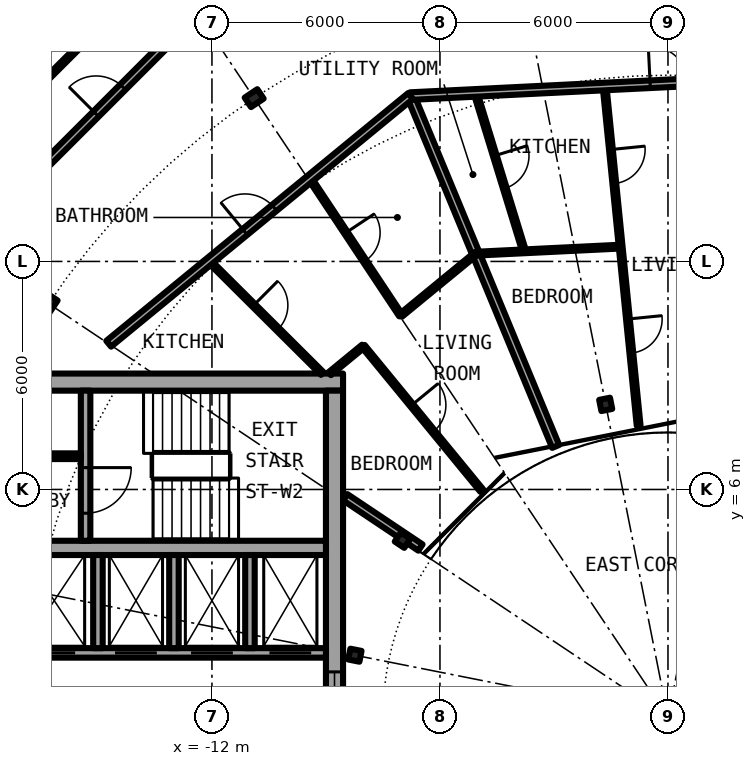
"""IFC4 building model, lengths in metres.
Left out: names, types, materials, properties, quantities, classifications, styles, units other than length and angle.
Written with IfcOpenShell. Run it as: python <this file> out.ifc"""

import sys

from ifc_helpers import new_model, si_unit, direction, frame, frame_2d, origin, origin_2d, place, context, subcontext, project, spatial, rectangle, i_section, extrude, element, fill, save


model = new_model("IFC4")
c1 = context("Model", 3, precision=1e-05, world=origin(), true_north=direction((0.0, 1.0)))
c2 = subcontext(c1, "Body", "Model", "MODEL_VIEW")
j1 = project(units=[si_unit("LENGTHUNIT", "METRE"), si_unit("PLANEANGLEUNIT", "RADIAN")], contexts=[c1])
p1 = place(None, origin())
s1 = spatial("IfcSite", under=j1, at=p1, CompositionType="ELEMENT")
p2 = place(p1, origin())
s2 = spatial("IfcBuilding", under=s1, at=p2, CompositionType="ELEMENT")
p3 = place(p2, frame((0.0, 0.0, 202.4)))
s3 = spatial("IfcBuildingStorey", under=s2, at=p3, CompositionType="ELEMENT", Elevation=202.4)
for number, where, z_axis, x_axis in (
    (1, (-10.889, 16.297, 0.0), (0.0, 0.0, 1.0), (-0.556, 0.831, 0.0)),
    (2, (-16.297, 10.889, 0.0), (0.0, 0.0, 1.0), (-0.831, 0.556, 0.0)),
):
    element("IfcColumn", number, at=place(p3, frame(where, z_axis=z_axis, x_axis=x_axis)), inside=s3, PredefinedType="COLUMN", context=c2, shape_type="SweptSolid", body=[
        extrude(i_section(OverallWidth=0.3, OverallDepth=0.4, WebThickness=0.013, FlangeThickness=0.024, FilletRadius=0.027, at=origin_2d()), origin(), (0.0, 0.0, 1.0), 3.05),
    ])
for number, where, z_axis, x_axis in (
    (3, (-1.639, 8.239, 0.0), (0.0, 0.0, 1.0), (-0.195, 0.981, 0.0)),
    (4, (-6.984, 4.667, 0.0), (0.0, 0.0, 1.0), (-0.831, 0.556, 0.0)),
    (5, (-8.239, 1.639, 0.0), (0.0, 0.0, 1.0), (-0.981, 0.195, 0.0)),
):
    element("IfcColumn", number, at=place(p3, frame(where, z_axis=z_axis, x_axis=x_axis)), inside=s3, PredefinedType="COLUMN", context=c2, shape_type="SweptSolid", body=[
        extrude(i_section(OverallWidth=0.3, OverallDepth=0.29, WebThickness=0.009, FlangeThickness=0.014, FilletRadius=0.027, at=origin_2d()), origin(), (0.0, 0.0, 1.0), 3.05),
    ])
p4 = place(p3, frame((-8.55, 8.825, 0.0), z_axis=(0.0, 0.0, 1.0), x_axis=(-1.0, 0.0, 0.0)))
e6 = element("IfcWall", 6, at=p4, inside=s3, PredefinedType="SHEAR", context=c2, shape_type="SweptSolid", body=[
    extrude(rectangle(XDim=13.5, YDim=0.45, at=frame_2d((6.75, 0.0))), origin(), (0.0, 0.0, 1.0), 3.05),
])
p5 = place(p4, frame((11.325, 0.0, 0.0)))
e7 = element("IfcOpeningElement", 7, at=p5, cuts=e6, PredefinedType="OPENING", context=c2, shape_type="SweptSolid", body=[
    extrude(rectangle(XDim=1.2, YDim=2.3, at=frame_2d((0.6, 1.15))), frame((0.0, 0.235, 0.0), z_axis=(0.0, -1.0, 0.0), x_axis=(1.0, 0.0, 0.0)), (0.0, 0.0, 1.0), 0.47),
])
p6 = place(p3, frame((-8.775, 8.6, 0.0), z_axis=(0.0, 0.0, 1.0), x_axis=(0.0, -1.0, 0.0)))
e8 = element("IfcWall", 8, at=p6, inside=s3, PredefinedType="SHEAR", context=c2, shape_type="SweptSolid", body=[
    extrude(rectangle(XDim=17.2, YDim=0.45, at=frame_2d((8.6, 0.0))), origin(), (0.0, 0.0, 1.0), 3.05),
])
p7 = place(p6, frame((7.4, 0.0, 0.1)))
e9 = element("IfcOpeningElement", 9, at=p7, cuts=e8, PredefinedType="OPENING", context=c2, shape_type="SweptSolid", body=[
    extrude(rectangle(XDim=2.4, YDim=2.2, at=frame_2d((1.2, 1.1))), frame((0.0, 0.235, 0.0), z_axis=(0.0, -1.0, 0.0), x_axis=(1.0, 0.0, 0.0)), (0.0, 0.0, 1.0), 0.47),
])
p8 = place(p3, frame((-9.0, 1.7, 0.0), z_axis=(0.0, 0.0, 1.0), x_axis=(-1.0, 0.0, 0.0)))
e10 = element("IfcWall", 10, at=p8, inside=s3, PredefinedType="SHEAR", context=c2, shape_type="SweptSolid", body=[
    extrude(rectangle(XDim=10.15, YDim=0.25, at=frame_2d((5.075, 0.0))), origin(), (0.0, 0.0, 1.0), 3.05),
])
p9 = place(p8, frame((0.387, 0.0, 0.0)))
e11 = element("IfcOpeningElement", 11, at=p9, cuts=e10, PredefinedType="OPENING", context=c2, shape_type="SweptSolid", body=[
    extrude(rectangle(XDim=1.1, YDim=2.3, at=frame_2d((0.55, 1.15))), frame((0.0, 0.135, 0.0), z_axis=(0.0, -1.0, 0.0), x_axis=(1.0, 0.0, 0.0)), (0.0, 0.0, 1.0), 0.27),
])
p10 = place(p8, frame((2.45, 0.0, 0.0)))
e12 = element("IfcOpeningElement", 12, at=p10, cuts=e10, PredefinedType="OPENING", context=c2, shape_type="SweptSolid", body=[
    extrude(rectangle(XDim=1.1, YDim=2.3, at=frame_2d((0.55, 1.15))), frame((0.0, 0.135, 0.0), z_axis=(0.0, -1.0, 0.0), x_axis=(1.0, 0.0, 0.0)), (0.0, 0.0, 1.0), 0.27),
])
p11 = place(p8, frame((4.45, 0.0, 0.0)))
e13 = element("IfcOpeningElement", 13, at=p11, cuts=e10, PredefinedType="OPENING", context=c2, shape_type="SweptSolid", body=[
    extrude(rectangle(XDim=1.1, YDim=2.3, at=frame_2d((0.55, 1.15))), frame((0.0, 0.135, 0.0), z_axis=(0.0, -1.0, 0.0), x_axis=(1.0, 0.0, 0.0)), (0.0, 0.0, 1.0), 0.27),
])
p12 = place(p8, frame((6.6, 0.0, 0.0)))
e14 = element("IfcOpeningElement", 14, at=p12, cuts=e10, PredefinedType="OPENING", context=c2, shape_type="SweptSolid", body=[
    extrude(rectangle(XDim=1.1, YDim=2.3, at=frame_2d((0.55, 1.15))), frame((0.0, 0.135, 0.0), z_axis=(0.0, -1.0, 0.0), x_axis=(1.0, 0.0, 0.0)), (0.0, 0.0, 1.0), 0.27),
])
p13 = place(p3, frame((-9.0, 4.462, 0.0), z_axis=(0.0, 0.0, 1.0), x_axis=(-1.0, 0.0, 0.0)))
e15 = element("IfcWall", 15, at=p13, inside=s3, PredefinedType="SHEAR", context=c2, shape_type="SweptSolid", body=[
    extrude(rectangle(XDim=10.15, YDim=0.375, at=frame_2d((5.075, 0.0))), origin(), (0.0, 0.0, 1.0), 3.05),
])
p14 = place(p3, frame((-15.325, 8.6, 0.0), z_axis=(0.0, 0.0, 1.0), x_axis=(0.0, -1.0, 0.0)))
e16 = element("IfcWall", 16, at=p14, inside=s3, PredefinedType="SHEAR", context=c2, shape_type="SweptSolid", body=[
    extrude(rectangle(XDim=3.95, YDim=0.25, at=frame_2d((1.975, 0.0))), origin(), (0.0, 0.0, 1.0), 3.05),
])
p15 = place(p14, frame((2.025, 0.0, 0.0)))
e17 = element("IfcOpeningElement", 17, at=p15, cuts=e16, PredefinedType="OPENING", context=c2, shape_type="SweptSolid", body=[
    extrude(rectangle(XDim=1.2, YDim=2.3, at=frame_2d((0.6, 1.15))), frame((0.0, 0.135, 0.0), z_axis=(0.0, -1.0, 0.0), x_axis=(1.0, 0.0, 0.0)), (0.0, 0.0, 1.0), 0.27),
])
for number, where, z_axis, x_axis in (
    (18, (-15.0, 1.825, 0.0), (0.0, 0.0, 1.0), (0.0, 1.0, 0.0)),
    (19, (-11.0, 1.825, 0.0), (0.0, 0.0, 1.0), (0.0, 1.0, 0.0)),
    (20, (-13.0, 1.825, 0.0), (0.0, 0.0, 1.0), (0.0, 1.0, 0.0)),
):
    element("IfcWall", number, at=place(p3, frame(where, z_axis=z_axis, x_axis=x_axis)), inside=s3, PredefinedType="SOLIDWALL", context=c2, shape_type="SweptSolid", body=[
        extrude(rectangle(XDim=2.45, YDim=0.25, at=frame_2d((1.225, 0.0))), origin(), (0.0, 0.0, 1.0), 2.7),
    ])
p16 = place(p3, frame((-15.45, 6.875, 0.0), z_axis=(0.0, 0.0, 1.0), x_axis=(-1.0, 0.0, 0.0)))
e21 = element("IfcWall", 21, at=p16, inside=s3, PredefinedType="PARTITIONING", context=c2, shape_type="SweptSolid", body=[
    extrude(rectangle(XDim=3.7, YDim=0.15, at=frame_2d((1.85, 0.0))), origin(), (0.0, 0.0, 1.0), 2.7),
])
p17 = place(p16, frame((1.4, 0.0, 0.0)))
e22 = element("IfcOpeningElement", 22, at=p17, cuts=e21, PredefinedType="OPENING", context=c2, shape_type="SweptSolid", body=[
    extrude(rectangle(XDim=0.9, YDim=2.3, at=frame_2d((0.45, 1.15))), frame((0.0, 0.085, 0.0), z_axis=(0.0, -1.0, 0.0), x_axis=(1.0, 0.0, 0.0)), (0.0, 0.0, 1.0), 0.17),
])
p18 = place(p3, frame((-5.066, 16.438, 0.0), z_axis=(0.0, 0.0, 1.0), x_axis=(0.293735983257, -0.955886589581, 0.0)))
e23 = element("IfcWall", 23, at=p18, inside=s3, PredefinedType="PARTITIONING", context=c2, shape_type="SweptSolid", body=[
    extrude(rectangle(XDim=4.365, YDim=0.1, at=frame_2d((2.182, 0.0))), origin(), (0.0, 0.0, 1.0), 2.7),
])
p19 = place(p18, frame((1.732, 0.0, 0.0)))
e24 = element("IfcOpeningElement", 24, at=p19, cuts=e23, PredefinedType="OPENING", context=c2, shape_type="SweptSolid", body=[
    extrude(rectangle(XDim=0.9, YDim=2.3, at=frame_2d((0.45, 1.15))), frame((0.0, 0.06, 0.0), z_axis=(0.0, -1.0, 0.0), x_axis=(1.0, 0.0, 0.0)), (0.0, 0.0, 1.0), 0.12),
])
p20 = place(p3, frame((-12.069, 12.007, 0.0), z_axis=(0.0, 0.0, 1.0), x_axis=(0.708909651863, -0.705299302067, 0.0)))
e25 = element("IfcWall", 25, at=p20, inside=s3, PredefinedType="PARTITIONING", context=c2, shape_type="SweptSolid", body=[
    extrude(rectangle(XDim=4.193, YDim=0.1, at=frame_2d((2.096, 0.0))), origin(), (0.0, 0.0, 1.0), 2.7),
])
p21 = place(p20, frame((1.646, 0.0, 0.0)))
e26 = element("IfcOpeningElement", 26, at=p21, cuts=e25, PredefinedType="OPENING", context=c2, shape_type="SweptSolid", body=[
    extrude(rectangle(XDim=0.9, YDim=2.3, at=frame_2d((0.45, 1.15))), frame((0.0, 0.06, 0.0), z_axis=(0.0, -1.0, 0.0), x_axis=(1.0, 0.0, 0.0)), (0.0, 0.0, 1.0), 0.12),
])
p22 = place(p3, frame((-9.421, 14.18, 0.0), z_axis=(0.0, 0.0, 1.0), x_axis=(0.553303732327, -0.832979579457, 0.0)))
e27 = element("IfcWall", 27, at=p22, inside=s3, PredefinedType="PARTITIONING", context=c2, shape_type="SweptSolid", body=[
    extrude(rectangle(XDim=4.319, YDim=0.1, at=frame_2d((2.16, 0.0))), origin(), (0.0, 0.0, 1.0), 2.7),
])
p23 = place(p22, frame((1.71, 0.0, 0.0)))
e28 = element("IfcOpeningElement", 28, at=p23, cuts=e27, PredefinedType="OPENING", context=c2, shape_type="SweptSolid", body=[
    extrude(rectangle(XDim=0.9, YDim=2.3, at=frame_2d((0.45, 1.15))), frame((0.0, 0.06, 0.0), z_axis=(0.0, -1.0, 0.0), x_axis=(1.0, 0.0, 0.0)), (0.0, 0.0, 1.0), 0.12),
])
p24 = place(p3, frame((-8.019, 9.771, 0.0), z_axis=(0.0, 0.0, 1.0), x_axis=(0.634401778971, -0.773003481776, 0.0)))
e29 = element("IfcWall", 29, at=p24, inside=s3, PredefinedType="PARTITIONING", context=c2, shape_type="SweptSolid", body=[
    extrude(rectangle(XDim=4.92, YDim=0.1, at=frame_2d((2.46, 0.0))), origin(), (0.0, 0.0, 1.0), 2.7),
])
p25 = place(p24, frame((2.01, 0.0, 0.0)))
e30 = element("IfcOpeningElement", 30, at=p25, cuts=e29, PredefinedType="OPENING", context=c2, shape_type="SweptSolid", body=[
    extrude(rectangle(XDim=0.9, YDim=2.3, at=frame_2d((0.45, 1.15))), frame((0.0, 0.06, 0.0), z_axis=(0.0, -1.0, 0.0), x_axis=(1.0, 0.0, 0.0)), (0.0, 0.0, 1.0), 0.12),
])
p26 = place(p3, frame((-6.773, 16.353, 0.0), z_axis=(0.0, 0.0, 1.0), x_axis=(0.382549125466, -0.923935152814, 0.0)))
e31 = element("IfcWall", 31, at=p26, inside=s3, PredefinedType="PARTITIONING", context=c2, shape_type="SweptSolid", body=[
    extrude(rectangle(XDim=9.98, YDim=0.2, at=frame_2d((4.99, 0.0))), origin(), (0.0, 0.0, 1.0), 2.7),
])
p27 = place(p3, frame((-1.668, 16.603, 0.0), z_axis=(0.0, 0.0, 1.0), x_axis=(0.099921543882, -0.994995319119, 0.0)))
e32 = element("IfcWall", 32, at=p27, inside=s3, PredefinedType="PARTITIONING", context=c2, shape_type="SweptSolid", body=[
    extrude(rectangle(XDim=8.967, YDim=0.1, at=frame_2d((4.483, 0.0))), origin(), (0.0, 0.0, 1.0), 2.7),
])
p28 = place(p27, frame((1.667, 0.0, 0.0)))
e33 = element("IfcOpeningElement", 33, at=p28, cuts=e32, PredefinedType="OPENING", context=c2, shape_type="SweptSolid", body=[
    extrude(rectangle(XDim=0.9, YDim=2.3, at=frame_2d((0.45, 1.15))), frame((0.0, 0.06, 0.0), z_axis=(0.0, -1.0, 0.0), x_axis=(1.0, 0.0, 0.0)), (0.0, 0.0, 1.0), 0.12),
])
p29 = place(p27, frame((6.15, 0.0, 0.0)))
e34 = element("IfcOpeningElement", 34, at=p29, cuts=e32, PredefinedType="OPENING", context=c2, shape_type="SweptSolid", body=[
    extrude(rectangle(XDim=0.9, YDim=2.3, at=frame_2d((0.45, 1.15))), frame((0.0, 0.06, 0.0), z_axis=(0.0, -1.0, 0.0), x_axis=(1.0, 0.0, 0.0)), (0.0, 0.0, 1.0), 0.12),
])
p30 = place(p3, frame((-6.513, 4.472, 0.0), z_axis=(0.0, 0.0, 1.0), x_axis=(-0.831403409976, 0.555669299026, 0.0)))
e35 = element("IfcWall", 35, at=p30, inside=s3, PredefinedType="PARTITIONING", context=c2, shape_type="SweptSolid", body=[
    extrude(rectangle(XDim=2.383, YDim=0.2, at=frame_2d((1.191, 0.0))), origin(), (0.0, 0.0, 1.0), 2.7),
])
p31 = place(p3, frame((-5.055, 12.204, 0.0), z_axis=(0.0, 0.0, 1.0), x_axis=(0.998816217325, 0.048643231882, 0.0)))
e36 = element("IfcWall", 36, at=p31, inside=s3, PredefinedType="PARTITIONING", context=c2, shape_type="SweptSolid", body=[
    extrude(rectangle(XDim=3.82, YDim=0.1, at=frame_2d((1.91, 0.0))), origin(), (0.0, 0.0, 1.0), 2.7),
])
p32 = place(p3, frame((-8.902, 9.046, 0.0), z_axis=(0.0, 0.0, 1.0), x_axis=(0.772842270779, 0.63459815986, 0.0)))
e37 = element("IfcWall", 37, at=p32, inside=s3, PredefinedType="PARTITIONING", context=c2, shape_type="SweptSolid", body=[
    extrude(rectangle(XDim=1.143, YDim=0.1, at=frame_2d((0.571, 0.0))), origin(), (0.0, 0.0, 1.0), 2.7),
])
p33 = place(p3, frame((-7.033, 10.581, 0.0), z_axis=(0.0, 0.0, 1.0), x_axis=(0.772990508216, 0.634417586617, 0.0)))
e38 = element("IfcWall", 38, at=p33, inside=s3, PredefinedType="PARTITIONING", context=c2, shape_type="SweptSolid", body=[
    extrude(rectangle(XDim=2.556, YDim=0.1, at=frame_2d((1.278, 0.0))), origin(), (0.0, 0.0, 1.0), 2.7),
])
p34 = place(p3, frame((-6.783, 16.35, 0.0), z_axis=(0.0, 0.0, 1.0), x_axis=(0.998781156301, 0.049357895202, 0.0)))
e39 = element("IfcWall", 39, at=p34, inside=s3, PredefinedType="PARTITIONING", context=c2, shape_type="SweptSolid", body=[
    extrude(rectangle(XDim=11.931, YDim=0.2, at=frame_2d((5.965, 0.0))), origin(), (0.0, 0.0, 1.0), 2.7),
])
p35 = place(p34, frame((6.322, 0.0, 0.0)))
e40 = element("IfcOpeningElement", 40, at=p35, cuts=e39, PredefinedType="OPENING", context=c2, shape_type="SweptSolid", body=[
    extrude(rectangle(XDim=1.0, YDim=2.3, at=frame_2d((0.5, 1.15))), frame((0.0, 0.11, 0.0), z_axis=(0.0, -1.0, 0.0), x_axis=(1.0, 0.0, 0.0)), (0.0, 0.0, 1.0), 0.22),
])
p36 = place(p3, frame((-14.717, 9.834, 0.0), z_axis=(0.0, 0.0, 1.0), x_axis=(0.773034536097, 0.634363938131, 0.0)))
e41 = element("IfcWall", 41, at=p36, inside=s3, PredefinedType="PARTITIONING", context=c2, shape_type="SweptSolid", body=[
    extrude(rectangle(XDim=10.277, YDim=0.2, at=frame_2d((5.138, 0.0))), origin(), (0.0, 0.0, 1.0), 2.7),
])
p37 = place(p36, frame((4.638, 0.0, 0.0)))
e42 = element("IfcOpeningElement", 42, at=p37, cuts=e41, PredefinedType="OPENING", context=c2, shape_type="SweptSolid", body=[
    extrude(rectangle(XDim=1.0, YDim=2.3, at=frame_2d((0.5, 1.15))), frame((0.0, 0.11, 0.0), z_axis=(0.0, -1.0, 0.0), x_axis=(1.0, 0.0, 0.0)), (0.0, 0.0, 1.0), 0.22),
])
p38 = place(p3, frame((-18.542, 12.389, 0.0), z_axis=(0.0, 0.0, 1.0), x_axis=(0.707106781187, 0.707106781187, 0.0)))
e43 = element("IfcWall", 43, at=p38, inside=s3, PredefinedType="PARTITIONING", context=c2, shape_type="SweptSolid", body=[
    extrude(rectangle(XDim=8.702, YDim=0.2, at=frame_2d((4.351, 0.0))), origin(), (0.0, 0.0, 1.0), 2.7),
])
p39 = place(p38, frame((4.938, 0.0, 0.0)))
e44 = element("IfcOpeningElement", 44, at=p39, cuts=e43, PredefinedType="OPENING", context=c2, shape_type="SweptSolid", body=[
    extrude(rectangle(XDim=1.0, YDim=2.3, at=frame_2d((0.5, 1.15))), frame((0.0, 0.11, 0.0), z_axis=(0.0, -1.0, 0.0), x_axis=(1.0, 0.0, 0.0)), (0.0, 0.0, 1.0), 0.22),
])
p40 = place(p3, frame((-16.575, 16.575, 0.0), z_axis=(0.0, 0.0, 1.0), x_axis=(0.707080600289, 0.707132961115, 0.0)))
e45 = element("IfcWall", 45, at=p40, inside=s3, PredefinedType="PARTITIONING", context=c2, shape_type="SweptSolid", body=[
    extrude(rectangle(XDim=4.663, YDim=0.1, at=frame_2d((2.331, 0.0))), origin(), (0.0, 0.0, 1.0), 2.7),
])
p41 = place(p40, frame((3.043, 0.0, 0.0)))
e46 = element("IfcOpeningElement", 46, at=p41, cuts=e45, PredefinedType="OPENING", context=c2, shape_type="SweptSolid", body=[
    extrude(rectangle(XDim=0.9, YDim=2.3, at=frame_2d((0.45, 1.15))), frame((0.0, 0.06, 0.0), z_axis=(0.0, -1.0, 0.0), x_axis=(1.0, 0.0, 0.0)), (0.0, 0.0, 1.0), 0.12),
])
p42 = place(p9, origin())
e47 = element("IfcDoor", 47, at=p42, inside=s3, OperationType="DOUBLE_DOOR_SLIDING", PredefinedType="DOOR", context=c2, shape_type="SweptSolid", body=[
    extrude(rectangle(XDim=1.1, YDim=2.3, at=frame_2d((0.55, 1.15))), frame((0.0, 0.025, 0.0), z_axis=(0.0, -1.0, 0.0), x_axis=(1.0, 0.0, 0.0)), (0.0, 0.0, 1.0), 0.05),
])
fill(e11, e47)
p43 = place(p10, origin())
e48 = element("IfcDoor", 48, at=p43, inside=s3, OperationType="DOUBLE_DOOR_SLIDING", PredefinedType="DOOR", context=c2, shape_type="SweptSolid", body=[
    extrude(rectangle(XDim=1.1, YDim=2.3, at=frame_2d((0.55, 1.15))), frame((0.0, 0.025, 0.0), z_axis=(0.0, -1.0, 0.0), x_axis=(1.0, 0.0, 0.0)), (0.0, 0.0, 1.0), 0.05),
])
fill(e12, e48)
p44 = place(p11, origin())
e49 = element("IfcDoor", 49, at=p44, inside=s3, OperationType="DOUBLE_DOOR_SLIDING", PredefinedType="DOOR", context=c2, shape_type="SweptSolid", body=[
    extrude(rectangle(XDim=1.1, YDim=2.3, at=frame_2d((0.55, 1.15))), frame((0.0, 0.025, 0.0), z_axis=(0.0, -1.0, 0.0), x_axis=(1.0, 0.0, 0.0)), (0.0, 0.0, 1.0), 0.05),
])
fill(e13, e49)
p45 = place(p12, origin())
e50 = element("IfcDoor", 50, at=p45, inside=s3, OperationType="DOUBLE_DOOR_SLIDING", PredefinedType="DOOR", context=c2, shape_type="SweptSolid", body=[
    extrude(rectangle(XDim=1.1, YDim=2.3, at=frame_2d((0.55, 1.15))), frame((0.0, 0.025, 0.0), z_axis=(0.0, -1.0, 0.0), x_axis=(1.0, 0.0, 0.0)), (0.0, 0.0, 1.0), 0.05),
])
fill(e14, e50)
p46 = place(p15, origin())
e51 = element("IfcDoor", 51, at=p46, inside=s3, OperationType="SINGLE_SWING_LEFT", PredefinedType="DOOR", context=c2, shape_type="SweptSolid", body=[
    extrude(rectangle(XDim=1.2, YDim=2.3, at=frame_2d((0.6, 1.15))), frame((0.0, 0.025, 0.0), z_axis=(0.0, -1.0, 0.0), x_axis=(1.0, 0.0, 0.0)), (0.0, 0.0, 1.0), 0.05),
])
fill(e17, e51)
p47 = place(p7, origin())
e52 = element("IfcWindow", 52, at=p47, inside=s3, PartitioningType="SINGLE_PANEL", PredefinedType="WINDOW", context=c2, shape_type="SweptSolid", body=[
    extrude(rectangle(XDim=2.4, YDim=2.2, at=frame_2d((1.2, 1.1))), frame((0.0, 0.03, 0.0), z_axis=(0.0, -1.0, 0.0), x_axis=(1.0, 0.0, 0.0)), (0.0, 0.0, 1.0), 0.06),
])
fill(e9, e52)
p48 = place(p39, origin())
e53 = element("IfcDoor", 53, at=p48, inside=s3, OperationType="SINGLE_SWING_RIGHT", PredefinedType="DOOR", context=c2, shape_type="SweptSolid", body=[
    extrude(rectangle(XDim=1.0, YDim=2.3, at=frame_2d((0.5, 1.15))), frame((0.0, 0.025, 0.0), z_axis=(0.0, -1.0, 0.0), x_axis=(1.0, 0.0, 0.0)), (0.0, 0.0, 1.0), 0.05),
])
fill(e44, e53)
p49 = place(p35, origin())
e54 = element("IfcDoor", 54, at=p49, inside=s3, OperationType="SINGLE_SWING_RIGHT", PredefinedType="DOOR", context=c2, shape_type="SweptSolid", body=[
    extrude(rectangle(XDim=1.0, YDim=2.3, at=frame_2d((0.5, 1.15))), frame((0.0, 0.025, 0.0), z_axis=(0.0, -1.0, 0.0), x_axis=(1.0, 0.0, 0.0)), (0.0, 0.0, 1.0), 0.05),
])
fill(e40, e54)
p50 = place(p28, origin())
e55 = element("IfcDoor", 55, at=p50, inside=s3, OperationType="SINGLE_SWING_LEFT", PredefinedType="DOOR", context=c2, shape_type="SweptSolid", body=[
    extrude(rectangle(XDim=0.9, YDim=2.3, at=frame_2d((0.45, 1.15))), frame((0.0, 0.025, 0.0), z_axis=(0.0, -1.0, 0.0), x_axis=(1.0, 0.0, 0.0)), (0.0, 0.0, 1.0), 0.05),
])
fill(e33, e55)
p51 = place(p19, origin())
e56 = element("IfcDoor", 56, at=p51, inside=s3, OperationType="SINGLE_SWING_LEFT", PredefinedType="DOOR", context=c2, shape_type="SweptSolid", body=[
    extrude(rectangle(XDim=0.9, YDim=2.3, at=frame_2d((0.45, 1.15))), frame((0.0, 0.025, 0.0), z_axis=(0.0, -1.0, 0.0), x_axis=(1.0, 0.0, 0.0)), (0.0, 0.0, 1.0), 0.05),
])
fill(e24, e56)
p52 = place(p29, origin())
e57 = element("IfcDoor", 57, at=p52, inside=s3, OperationType="SINGLE_SWING_RIGHT", PredefinedType="DOOR", context=c2, shape_type="SweptSolid", body=[
    extrude(rectangle(XDim=0.9, YDim=2.3, at=frame_2d((0.45, 1.15))), frame((0.0, 0.025, 0.0), z_axis=(0.0, -1.0, 0.0), x_axis=(1.0, 0.0, 0.0)), (0.0, 0.0, 1.0), 0.05),
])
fill(e34, e57)
p53 = place(p37, origin())
e58 = element("IfcDoor", 58, at=p53, inside=s3, OperationType="SINGLE_SWING_LEFT", PredefinedType="DOOR", context=c2, shape_type="SweptSolid", body=[
    extrude(rectangle(XDim=1.0, YDim=2.3, at=frame_2d((0.5, 1.15))), frame((0.0, 0.025, 0.0), z_axis=(0.0, -1.0, 0.0), x_axis=(1.0, 0.0, 0.0)), (0.0, 0.0, 1.0), 0.05),
])
fill(e42, e58)
p54 = place(p23, origin())
e59 = element("IfcDoor", 59, at=p54, inside=s3, OperationType="SINGLE_SWING_RIGHT", PredefinedType="DOOR", context=c2, shape_type="SweptSolid", body=[
    extrude(rectangle(XDim=0.9, YDim=2.3, at=frame_2d((0.45, 1.15))), frame((0.0, 0.025, 0.0), z_axis=(0.0, -1.0, 0.0), x_axis=(1.0, 0.0, 0.0)), (0.0, 0.0, 1.0), 0.05),
])
fill(e28, e59)
p55 = place(p21, origin())
e60 = element("IfcDoor", 60, at=p55, inside=s3, OperationType="SINGLE_SWING_RIGHT", PredefinedType="DOOR", context=c2, shape_type="SweptSolid", body=[
    extrude(rectangle(XDim=0.9, YDim=2.3, at=frame_2d((0.45, 1.15))), frame((0.0, 0.025, 0.0), z_axis=(0.0, -1.0, 0.0), x_axis=(1.0, 0.0, 0.0)), (0.0, 0.0, 1.0), 0.05),
])
fill(e26, e60)
p56 = place(p25, origin())
e61 = element("IfcDoor", 61, at=p56, inside=s3, OperationType="SINGLE_SWING_RIGHT", PredefinedType="DOOR", context=c2, shape_type="SweptSolid", body=[
    extrude(rectangle(XDim=0.9, YDim=2.3, at=frame_2d((0.45, 1.15))), frame((0.0, 0.025, 0.0), z_axis=(0.0, -1.0, 0.0), x_axis=(1.0, 0.0, 0.0)), (0.0, 0.0, 1.0), 0.05),
])
fill(e30, e61)
save(model, sys.argv[1])
